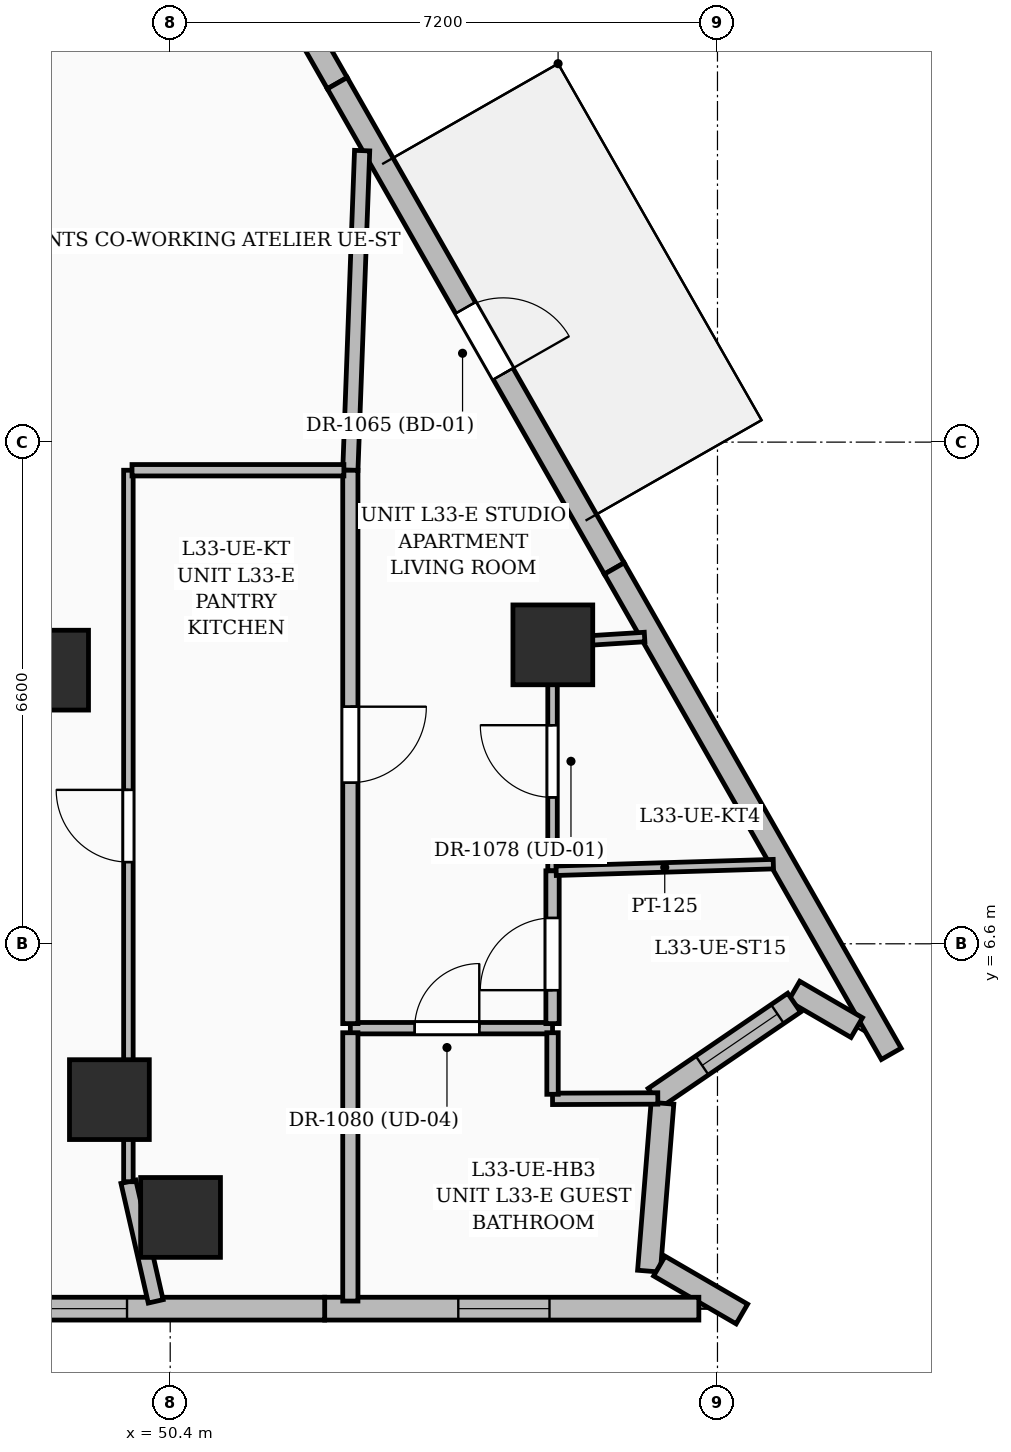
"""IFC4 building model, lengths in metres.
Left out: names, types, materials, properties, quantities, classifications, styles, units other than length and angle.
Written with IfcOpenShell. Run it as: python <this file> out.ifc"""

import sys

from ifc_helpers import new_model, si_unit, direction, frame, frame_2d, origin, origin_2d, place, context, subcontext, project, spatial, rectangle, extrude, element, fill, save


model = new_model("IFC4")
c1 = context("Model", 3, precision=1e-05, world=origin(), true_north=direction((0.0, 1.0)))
c2 = subcontext(c1, "Body", "Model", "MODEL_VIEW")
j1 = project(units=[si_unit("LENGTHUNIT", "METRE"), si_unit("PLANEANGLEUNIT", "RADIAN")], contexts=[c1])
p1 = place(None, origin())
s1 = spatial("IfcSite", under=j1, at=p1, CompositionType="ELEMENT")
p2 = place(p1, origin())
s2 = spatial("IfcBuilding", under=s1, at=p2, CompositionType="ELEMENT")
p3 = place(p2, frame((0.0, 0.0, 132.0)))
s3 = spatial("IfcBuildingStorey", under=s2, at=p3, CompositionType="ELEMENT", Elevation=132.0)
for number, where, z_axis, x_axis in (
    (1, (49.6, 4.55, 0.0), (0.0, 0.0, 1.0), (1.0, 0.0, 0.0)),
    (2, (48.8, 10.2, 0.0), (0.0, 0.0, 1.0), (1.0, 0.0, 0.0)),
    (3, (50.536, 3.0, 0.0), (0.0, 0.0, 1.0), (1.0, 0.0, 0.0)),
    (4, (55.434, 10.533, 0.0), (0.0, 0.0, 1.0), (1.0, 0.0, 0.0)),
):
    element("IfcColumn", number, at=place(p3, frame(where, z_axis=z_axis, x_axis=x_axis)), inside=s3, PredefinedType="COLUMN", context=c2, shape_type="SweptSolid", body=[
        extrude(rectangle(XDim=1.05, YDim=1.05, at=origin_2d()), origin(), (0.0, 0.0, 1.0), 3.6),
    ])
p4 = place(p3, frame((49.09, 24.069, 0.0), z_axis=(0.0, 0.0, 1.0), x_axis=(0.495704199243, -0.868491420137, 0.0)))
e5 = element("IfcWall", 5, at=p4, inside=s3, PredefinedType="SOLIDWALL", context=c2, shape_type="SweptSolid", body=[
    extrude(rectangle(XDim=7.077, YDim=0.3, at=frame_2d((3.539, 0.0))), origin(), (0.0, 0.0, 1.0), 3.35),
])
p5 = place(p4, frame((4.375, 0.0, 0.6)))
e6 = element("IfcOpeningElement", 6, at=p5, cuts=e5, PredefinedType="OPENING", context=c2, shape_type="SweptSolid", body=[
    extrude(rectangle(XDim=1.5, YDim=2.1, at=frame_2d((0.75, 1.05))), frame((0.0, 0.16, 0.0), z_axis=(0.0, -1.0, 0.0), x_axis=(1.0, 0.0, 0.0)), (0.0, 0.0, 1.0), 0.32),
])
p6 = place(p3, frame((52.598, 17.923, 0.0), z_axis=(0.0, 0.0, 1.0), x_axis=(0.495698993586, -0.868494391322, 0.0)))
e7 = element("IfcWall", 7, at=p6, inside=s3, PredefinedType="SOLIDWALL", context=c2, shape_type="SweptSolid", body=[
    extrude(rectangle(XDim=7.352, YDim=0.3, at=frame_2d((3.676, 0.0))), origin(), (0.0, 0.0, 1.0), 3.35),
])
p7 = place(p6, frame((3.403, 0.0, 0.0)))
e8 = element("IfcOpeningElement", 8, at=p7, cuts=e7, PredefinedType="OPENING", context=c2, shape_type="SweptSolid", body=[
    extrude(rectangle(XDim=1.0, YDim=2.2, at=frame_2d((0.5, 1.1))), frame((0.0, 0.16, 0.0), z_axis=(0.0, -1.0, 0.0), x_axis=(1.0, 0.0, 0.0)), (0.0, 0.0, 1.0), 0.32),
])
p8 = place(p3, frame((56.242, 11.538, 0.0), z_axis=(0.0, 0.0, 1.0), x_axis=(0.495684697404, -0.868502550808, 0.0)))
e9 = element("IfcWall", 9, at=p8, inside=s3, PredefinedType="SOLIDWALL", context=c2, shape_type="SweptSolid", body=[
    extrude(rectangle(XDim=7.352, YDim=0.3, at=frame_2d((3.676, 0.0))), origin(), (0.0, 0.0, 1.0), 3.35),
])
p9 = place(p3, frame((59.432, 5.498, 0.0), z_axis=(0.0, 0.0, 1.0), x_axis=(-0.864584698218, 0.502487113871, 0.0)))
e10 = element("IfcWall", 10, at=p9, inside=s3, PredefinedType="SOLIDWALL", context=c2, shape_type="SweptSolid", body=[
    extrude(rectangle(XDim=0.955, YDim=0.3, at=frame_2d((0.478, 0.0))), origin(), (0.0, 0.0, 1.0), 3.35),
])
p10 = place(p3, frame((58.608, 5.825, 0.0), z_axis=(0.0, 0.0, 1.0), x_axis=(-0.8261738865, -0.563415219234, 0.0)))
e11 = element("IfcWall", 11, at=p10, inside=s3, PredefinedType="SOLIDWALL", context=c2, shape_type="SweptSolid", body=[
    extrude(rectangle(XDim=2.222, YDim=0.3, at=frame_2d((1.111, 0.0))), origin(), (0.0, 0.0, 1.0), 3.35),
])
p11 = place(p10, frame((0.265, 0.0, 0.8)))
e12 = element("IfcOpeningElement", 12, at=p11, cuts=e11, PredefinedType="OPENING", context=c2, shape_type="SweptSolid", body=[
    extrude(rectangle(XDim=1.2, YDim=1.8, at=frame_2d((0.6, 0.9))), frame((0.0, 0.16, 0.0), z_axis=(0.0, -1.0, 0.0), x_axis=(1.0, 0.0, 0.0)), (0.0, 0.0, 1.0), 0.32),
])
p12 = place(p3, frame((56.876, 4.502, 0.0), z_axis=(0.0, 0.0, 1.0), x_axis=(-0.079981668757, -0.996796334595, 0.0)))
e13 = element("IfcWall", 13, at=p12, inside=s3, PredefinedType="SOLIDWALL", context=c2, shape_type="SweptSolid", body=[
    extrude(rectangle(XDim=2.216, YDim=0.3, at=frame_2d((1.108, 0.0))), origin(), (0.0, 0.0, 1.0), 3.35),
])
p13 = place(p3, frame((56.835, 2.36, 0.0), z_axis=(0.0, 0.0, 1.0), x_axis=(0.864799842676, -0.502116751471, 0.0)))
e14 = element("IfcWall", 14, at=p13, inside=s3, PredefinedType="SOLIDWALL", context=c2, shape_type="SweptSolid", body=[
    extrude(rectangle(XDim=1.255, YDim=0.3, at=frame_2d((0.628, 0.0))), origin(), (0.0, 0.0, 1.0), 3.35),
])
p14 = place(p3, frame((57.355, 1.8, 0.0), z_axis=(0.0, 0.0, 1.0), x_axis=(-1.0, 0.0, 0.0)))
e15 = element("IfcWall", 15, at=p14, inside=s3, PredefinedType="SOLIDWALL", context=c2, shape_type="SweptSolid", body=[
    extrude(rectangle(XDim=4.923, YDim=0.3, at=frame_2d((2.461, 0.0))), origin(), (0.0, 0.0, 1.0), 3.35),
])
p15 = place(p14, frame((1.965, 0.0, 0.8)))
e16 = element("IfcOpeningElement", 16, at=p15, cuts=e15, PredefinedType="OPENING", context=c2, shape_type="SweptSolid", body=[
    extrude(rectangle(XDim=1.2, YDim=1.8, at=frame_2d((0.6, 0.9))), frame((0.0, 0.16, 0.0), z_axis=(0.0, -1.0, 0.0), x_axis=(1.0, 0.0, 0.0)), (0.0, 0.0, 1.0), 0.32),
])
p16 = place(p3, frame((52.432, 1.8, 0.0), z_axis=(0.0, 0.0, 1.0), x_axis=(-1.0, 0.0, 0.0)))
e17 = element("IfcWall", 17, at=p16, inside=s3, PredefinedType="SOLIDWALL", context=c2, shape_type="SweptSolid", body=[
    extrude(rectangle(XDim=5.508, YDim=0.3, at=frame_2d((2.754, 0.0))), origin(), (0.0, 0.0, 1.0), 3.35),
])
p17 = place(p16, frame((2.6, 0.0, 0.55)))
e18 = element("IfcOpeningElement", 18, at=p17, cuts=e17, PredefinedType="OPENING", context=c2, shape_type="SweptSolid", body=[
    extrude(rectangle(XDim=2.1, YDim=2.4, at=frame_2d((1.05, 1.2))), frame((0.0, 0.16, 0.0), z_axis=(0.0, -1.0, 0.0), x_axis=(1.0, 0.0, 0.0)), (0.0, 0.0, 1.0), 0.32),
])
p18 = place(p3, frame((50.209, 1.896, 0.0), z_axis=(0.0, 0.0, 1.0), x_axis=(-0.222307375142, 0.97497663098, 0.0)))
e19 = element("IfcWall", 19, at=p18, inside=s3, PredefinedType="PARTITIONING", context=c2, shape_type="SweptSolid", body=[
    extrude(rectangle(XDim=1.614, YDim=0.2, at=frame_2d((0.807, 0.0))), origin(), (0.0, 0.0, 1.0), 2.57),
])
p19 = place(p3, frame((52.77, 5.49, 0.0), z_axis=(0.0, 0.0, 1.0), x_axis=(1.0, 0.0, 0.0)))
e20 = element("IfcWall", 20, at=p19, inside=s3, PredefinedType="PARTITIONING", context=c2, shape_type="SweptSolid", body=[
    extrude(rectangle(XDim=2.66, YDim=0.15, at=frame_2d((1.33, 0.0))), origin(), (0.0, 0.0, 1.0), 3.35),
])
p20 = place(p19, frame((0.846, 0.0, 0.0)))
e21 = element("IfcOpeningElement", 21, at=p20, cuts=e20, PredefinedType="OPENING", context=c2, shape_type="SweptSolid", body=[
    extrude(rectangle(XDim=0.85, YDim=2.1, at=frame_2d((0.425, 1.05))), frame((0.0, 0.085, 0.0), z_axis=(0.0, -1.0, 0.0), x_axis=(1.0, 0.0, 0.0)), (0.0, 0.0, 1.0), 0.17),
])
p21 = place(p3, frame((55.43, 7.56, 0.0), z_axis=(0.0, 0.0, 1.0), x_axis=(0.0, 1.0, 0.0)))
e22 = element("IfcWall", 22, at=p21, inside=s3, PredefinedType="PARTITIONING", context=c2, shape_type="SweptSolid", body=[
    extrude(rectangle(XDim=3.0, YDim=0.125, at=frame_2d((1.5, 0.0))), origin(), (0.0, 0.0, 1.0), 3.35),
])
p22 = place(p21, frame((0.966, 0.0, 0.0)))
e23 = element("IfcOpeningElement", 23, at=p22, cuts=e22, PredefinedType="OPENING", context=c2, shape_type="SweptSolid", body=[
    extrude(rectangle(XDim=0.95, YDim=2.2, at=frame_2d((0.475, 1.1))), frame((0.0, 0.072, 0.0), z_axis=(0.0, -1.0, 0.0), x_axis=(1.0, 0.0, 0.0)), (0.0, 0.0, 1.0), 0.145),
])
p23 = place(p3, frame((55.477, 10.562, 0.0), z_axis=(0.0, 0.0, 1.0), x_axis=(0.998012457517, 0.063016939315, 0.0)))
e24 = element("IfcWall", 24, at=p23, inside=s3, PredefinedType="PARTITIONING", context=c2, shape_type="SweptSolid", body=[
    extrude(rectangle(XDim=1.166, YDim=0.125, at=frame_2d((0.583, 0.0))), origin(), (0.0, 0.0, 1.0), 3.35),
])
p24 = place(p3, frame((55.43, 5.55, 0.0), z_axis=(0.0, 0.0, 1.0), x_axis=(0.0, 1.0, 0.0)))
e25 = element("IfcWall", 25, at=p24, inside=s3, PredefinedType="PARTITIONING", context=c2, shape_type="SweptSolid", body=[
    extrude(rectangle(XDim=2.01, YDim=0.175, at=frame_2d((1.005, 0.0))), origin(), (0.0, 0.0, 1.0), 3.35),
])
p25 = place(p24, frame((0.44, 0.0, 0.0)))
e26 = element("IfcOpeningElement", 26, at=p25, cuts=e25, PredefinedType="OPENING", context=c2, shape_type="SweptSolid", body=[
    extrude(rectangle(XDim=0.95, YDim=2.2, at=frame_2d((0.475, 1.1))), frame((0.0, 0.097, 0.0), z_axis=(0.0, -1.0, 0.0), x_axis=(1.0, 0.0, 0.0)), (0.0, 0.0, 1.0), 0.195),
])
p26 = place(p3, frame((52.925, 17.035, 0.0), z_axis=(0.0, 0.0, 1.0), x_axis=(-0.036844269136, -0.999321019409, 0.0)))
e27 = element("IfcWall", 27, at=p26, inside=s3, PredefinedType="PARTITIONING", context=c2, shape_type="SweptSolid", body=[
    extrude(rectangle(XDim=4.208, YDim=0.2, at=frame_2d((2.104, 0.0))), origin(), (0.0, 0.0, 1.0), 2.57),
])
p27 = place(p3, frame((52.77, 12.83, 0.0), z_axis=(0.0, 0.0, 1.0), x_axis=(0.0, -1.0, 0.0)))
e28 = element("IfcWall", 28, at=p27, inside=s3, PredefinedType="PARTITIONING", context=c2, shape_type="SweptSolid", body=[
    extrude(rectangle(XDim=7.28, YDim=0.2, at=frame_2d((3.64, 0.0))), origin(), (0.0, 0.0, 1.0), 2.372),
])
p28 = place(p27, frame((3.111, 0.0, 0.0)))
e29 = element("IfcOpeningElement", 29, at=p28, cuts=e28, PredefinedType="OPENING", context=c2, shape_type="SweptSolid", body=[
    extrude(rectangle(XDim=1.0, YDim=2.2, at=frame_2d((0.5, 1.1))), frame((0.0, 0.11, 0.0), z_axis=(0.0, -1.0, 0.0), x_axis=(1.0, 0.0, 0.0)), (0.0, 0.0, 1.0), 0.22),
])
p29 = place(p3, frame((56.815, 4.565, 0.0), z_axis=(0.0, 0.0, 1.0), x_axis=(-0.999993785583, -0.003525449623, 0.0)))
e30 = element("IfcWall", 30, at=p29, inside=s3, PredefinedType="PARTITIONING", context=c2, shape_type="SweptSolid", body=[
    extrude(rectangle(XDim=1.385, YDim=0.15, at=frame_2d((0.692, 0.0))), origin(), (0.0, 0.0, 1.0), 3.35),
])
p30 = place(p3, frame((55.43, 4.62, 0.0), z_axis=(0.0, 0.0, 1.0), x_axis=(0.0, 1.0, 0.0)))
e31 = element("IfcWall", 31, at=p30, inside=s3, PredefinedType="PARTITIONING", context=c2, shape_type="SweptSolid", body=[
    extrude(rectangle(XDim=0.81, YDim=0.15, at=frame_2d((0.405, 0.0))), origin(), (0.0, 0.0, 1.0), 3.35),
])
p31 = place(p3, frame((52.77, 5.43, 0.0), z_axis=(0.0, 0.0, 1.0), x_axis=(0.0, -1.0, 0.0)))
e32 = element("IfcWall", 32, at=p31, inside=s3, PredefinedType="PARTITIONING", context=c2, shape_type="SweptSolid", body=[
    extrude(rectangle(XDim=3.53, YDim=0.2, at=frame_2d((1.765, 0.0))), origin(), (0.0, 0.0, 1.0), 3.35),
])
p32 = place(p3, frame((55.478, 7.561, 0.0), z_axis=(0.0, 0.0, 1.0), x_axis=(0.99954031689, 0.030317567712, 0.0)))
e33 = element("IfcWall", 33, at=p32, inside=s3, PredefinedType="PARTITIONING", context=c2, shape_type="SweptSolid", body=[
    extrude(rectangle(XDim=2.859, YDim=0.125, at=frame_2d((1.429, 0.0))), origin(), (0.0, 0.0, 1.0), 3.35),
])
p33 = place(p3, frame((49.85, 3.47, 0.0), z_axis=(0.0, 0.0, 1.0), x_axis=(0.0, 1.0, 0.0)))
e34 = element("IfcWall", 34, at=p33, inside=s3, PredefinedType="PARTITIONING", context=c2, shape_type="SweptSolid", body=[
    extrude(rectangle(XDim=9.36, YDim=0.125, at=frame_2d((4.68, 0.0))), origin(), (0.0, 0.0, 1.0), 2.372),
])
p34 = place(p33, frame((4.205, 0.0, 0.0)))
e35 = element("IfcOpeningElement", 35, at=p34, cuts=e34, PredefinedType="OPENING", context=c2, shape_type="SweptSolid", body=[
    extrude(rectangle(XDim=0.95, YDim=2.2, at=frame_2d((0.475, 1.1))), frame((0.0, 0.072, 0.0), z_axis=(0.0, -1.0, 0.0), x_axis=(1.0, 0.0, 0.0)), (0.0, 0.0, 1.0), 0.145),
])
p35 = place(p3, frame((49.897, 12.83, 0.0), z_axis=(0.0, 0.0, 1.0), x_axis=(1.0, 0.0, 0.0)))
e36 = element("IfcWall", 36, at=p35, inside=s3, PredefinedType="PARTITIONING", context=c2, shape_type="SweptSolid", body=[
    extrude(rectangle(XDim=2.788, YDim=0.15, at=frame_2d((1.394, 0.0))), origin(), (0.0, 0.0, 1.0), 3.01),
])
p36 = place(p7, origin())
e37 = element("IfcDoor", 37, at=p36, inside=s3, OperationType="SINGLE_SWING_RIGHT", PredefinedType="DOOR", context=c2, shape_type="SweptSolid", body=[
    extrude(rectangle(XDim=1.0, YDim=2.2, at=frame_2d((0.5, 1.1))), frame((0.0, 0.025, 0.0), z_axis=(0.0, -1.0, 0.0), x_axis=(1.0, 0.0, 0.0)), (0.0, 0.0, 1.0), 0.05),
])
fill(e8, e37)
p37 = place(p11, origin())
e38 = element("IfcWindow", 38, at=p37, inside=s3, PartitioningType="SINGLE_PANEL", PredefinedType="WINDOW", context=c2, shape_type="SweptSolid", body=[
    extrude(rectangle(XDim=1.2, YDim=1.8, at=frame_2d((0.6, 0.9))), frame((0.0, 0.03, 0.0), z_axis=(0.0, -1.0, 0.0), x_axis=(1.0, 0.0, 0.0)), (0.0, 0.0, 1.0), 0.06),
])
fill(e12, e38)
p38 = place(p15, origin())
e39 = element("IfcWindow", 39, at=p38, inside=s3, PartitioningType="SINGLE_PANEL", PredefinedType="WINDOW", context=c2, shape_type="SweptSolid", body=[
    extrude(rectangle(XDim=1.2, YDim=1.8, at=frame_2d((0.6, 0.9))), frame((0.0, 0.03, 0.0), z_axis=(0.0, -1.0, 0.0), x_axis=(1.0, 0.0, 0.0)), (0.0, 0.0, 1.0), 0.06),
])
fill(e16, e39)
p39 = place(p17, origin())
e40 = element("IfcWindow", 40, at=p39, inside=s3, PartitioningType="SINGLE_PANEL", PredefinedType="WINDOW", context=c2, shape_type="SweptSolid", body=[
    extrude(rectangle(XDim=2.1, YDim=2.4, at=frame_2d((1.05, 1.2))), frame((0.0, 0.03, 0.0), z_axis=(0.0, -1.0, 0.0), x_axis=(1.0, 0.0, 0.0)), (0.0, 0.0, 1.0), 0.06),
])
fill(e18, e40)
p40 = place(p22, origin())
e41 = element("IfcDoor", 41, at=p40, inside=s3, OperationType="SINGLE_SWING_RIGHT", PredefinedType="DOOR", context=c2, shape_type="SweptSolid", body=[
    extrude(rectangle(XDim=0.95, YDim=2.2, at=frame_2d((0.475, 1.1))), frame((0.0, 0.025, 0.0), z_axis=(0.0, -1.0, 0.0), x_axis=(1.0, 0.0, 0.0)), (0.0, 0.0, 1.0), 0.05),
])
fill(e23, e41)
p41 = place(p25, origin())
e42 = element("IfcDoor", 42, at=p41, inside=s3, OperationType="SINGLE_SWING_LEFT", PredefinedType="DOOR", context=c2, shape_type="SweptSolid", body=[
    extrude(rectangle(XDim=0.95, YDim=2.2, at=frame_2d((0.475, 1.1))), frame((0.0, 0.025, 0.0), z_axis=(0.0, -1.0, 0.0), x_axis=(1.0, 0.0, 0.0)), (0.0, 0.0, 1.0), 0.05),
])
fill(e26, e42)
p42 = place(p20, origin())
e43 = element("IfcDoor", 43, at=p42, inside=s3, OperationType="SINGLE_SWING_RIGHT", PredefinedType="DOOR", context=c2, shape_type="SweptSolid", body=[
    extrude(rectangle(XDim=0.85, YDim=2.1, at=frame_2d((0.425, 1.05))), frame((0.0, 0.025, 0.0), z_axis=(0.0, -1.0, 0.0), x_axis=(1.0, 0.0, 0.0)), (0.0, 0.0, 1.0), 0.05),
])
fill(e21, e43)
p43 = place(p34, origin())
e44 = element("IfcDoor", 44, at=p43, inside=s3, OperationType="SINGLE_SWING_RIGHT", PredefinedType="DOOR", context=c2, shape_type="SweptSolid", body=[
    extrude(rectangle(XDim=0.95, YDim=2.2, at=frame_2d((0.475, 1.1))), frame((0.0, 0.025, 0.0), z_axis=(0.0, -1.0, 0.0), x_axis=(1.0, 0.0, 0.0)), (0.0, 0.0, 1.0), 0.05),
])
fill(e35, e44)
p44 = place(p28, origin())
e45 = element("IfcDoor", 45, at=p44, inside=s3, OperationType="SINGLE_SWING_LEFT", PredefinedType="DOOR", context=c2, shape_type="SweptSolid", body=[
    extrude(rectangle(XDim=1.0, YDim=2.2, at=frame_2d((0.5, 1.1))), frame((0.0, 0.025, 0.0), z_axis=(0.0, -1.0, 0.0), x_axis=(1.0, 0.0, 0.0)), (0.0, 0.0, 1.0), 0.05),
])
fill(e29, e45)
save(model, sys.argv[1])
